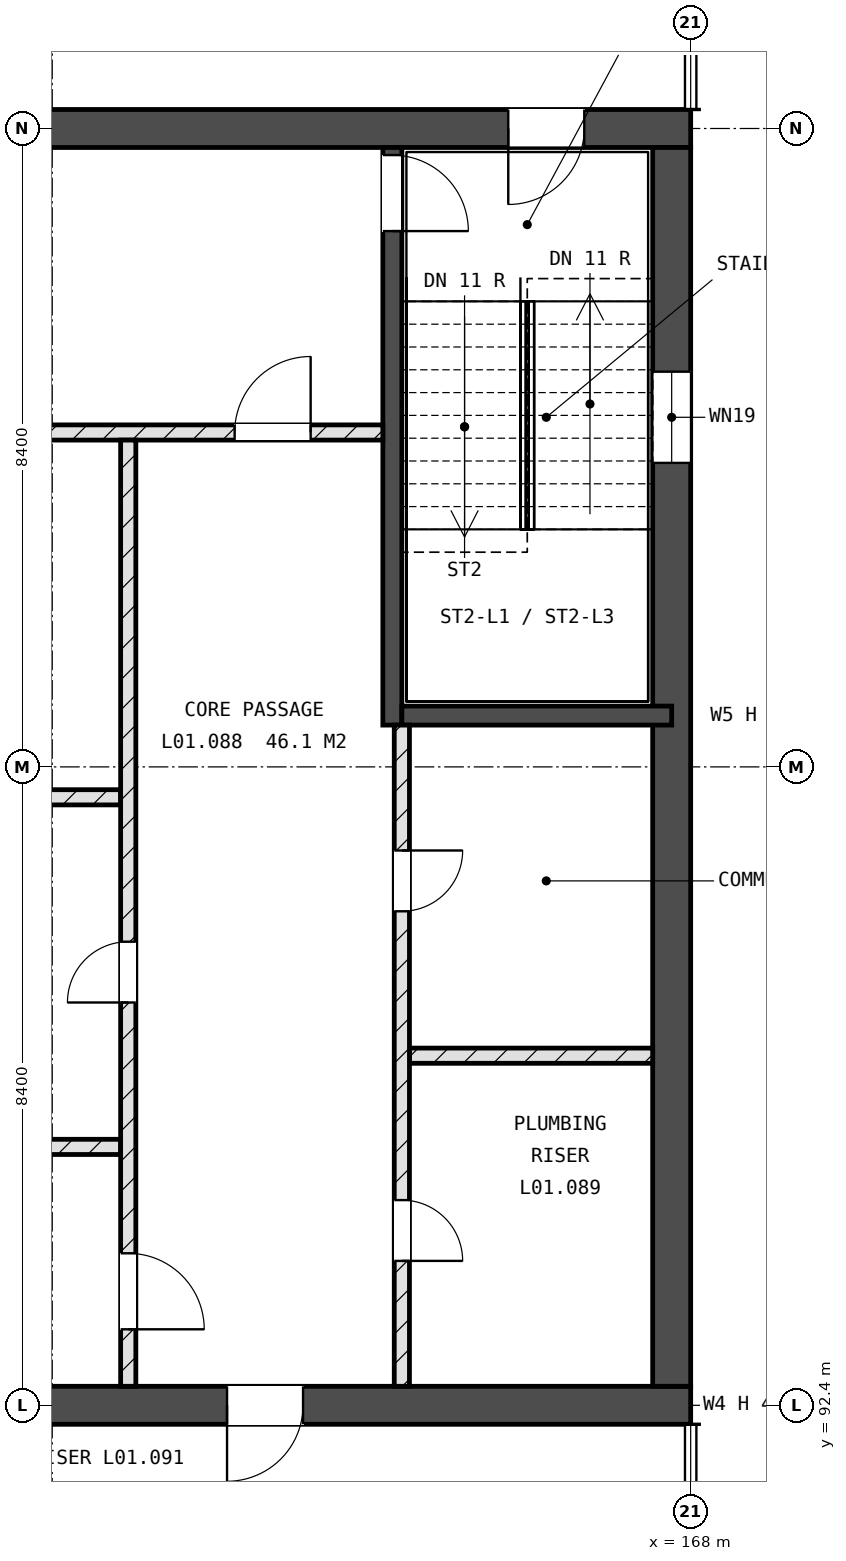
"""IFC4 building model, lengths in metres.
Left out: names, types, materials, properties, quantities, classifications, styles, units other than length and angle.
Written with IfcOpenShell. Run it as: python <this file> out.ifc"""

import sys

from ifc_helpers import new_model, si_unit, direction, frame, frame_2d, origin, place, context, subcontext, project, spatial, rectangle, extrude, element, fill, save


model = new_model("IFC4")
c1 = context("Model", 3, precision=1e-05, world=origin(), true_north=direction((0.0, 1.0)))
c2 = subcontext(c1, "Body", "Model", "MODEL_VIEW")
j1 = project(units=[si_unit("LENGTHUNIT", "METRE"), si_unit("PLANEANGLEUNIT", "RADIAN")], contexts=[c1])
p1 = place(None, origin())
s1 = spatial("IfcSite", under=j1, at=p1, CompositionType="ELEMENT")
p2 = place(p1, origin())
s2 = spatial("IfcBuilding", under=s1, at=p2, CompositionType="ELEMENT")
p3 = place(p2, frame((0.0, 0.0, 5.4)))
s3 = spatial("IfcBuildingStorey", under=s2, at=p3, CompositionType="ELEMENT", Elevation=5.4)
p4 = place(p3, frame((142.8, 92.4, -0.3), z_axis=(0.0, 0.0, 1.0), x_axis=(1.0, 0.0, 0.0)))
e1 = element("IfcWall", 1, at=p4, inside=s3, PredefinedType="SHEAR", context=c2, shape_type="SweptSolid", body=[
    extrude(rectangle(XDim=25.2, YDim=0.5, at=frame_2d((12.6, 0.0))), origin(), (0.0, 0.0, 1.0), 4.55),
])
p5 = place(p4, frame((1.4, 0.0, 0.3)))
e2 = element("IfcOpeningElement", 2, at=p5, cuts=e1, PredefinedType="OPENING", context=c2, shape_type="SweptSolid", body=[
    extrude(rectangle(XDim=1.0, YDim=2.1, at=frame_2d((0.5, 1.05))), frame((0.0, 0.26, 0.0), z_axis=(0.0, -1.0, 0.0), x_axis=(1.0, 0.0, 0.0)), (0.0, 0.0, 1.0), 0.52),
])
p6 = place(p4, frame((19.1, 0.0, 0.3)))
e3 = element("IfcOpeningElement", 3, at=p6, cuts=e1, PredefinedType="OPENING", context=c2, shape_type="SweptSolid", body=[
    extrude(rectangle(XDim=1.0, YDim=2.1, at=frame_2d((0.5, 1.05))), frame((0.0, 0.26, 0.0), z_axis=(0.0, -1.0, 0.0), x_axis=(1.0, 0.0, 0.0)), (0.0, 0.0, 1.0), 0.52),
])
p7 = place(p4, frame((10.4, 0.0, 0.3)))
e4 = element("IfcOpeningElement", 4, at=p7, cuts=e1, PredefinedType="OPENING", context=c2, shape_type="SweptSolid", body=[
    extrude(rectangle(XDim=1.0, YDim=2.1, at=frame_2d((0.5, 1.05))), frame((0.0, 0.26, 0.0), z_axis=(0.0, -1.0, 0.0), x_axis=(1.0, 0.0, 0.0)), (0.0, 0.0, 1.0), 0.52),
])
p8 = place(p3, frame((142.8, 109.2, -0.3), z_axis=(0.0, 0.0, 1.0), x_axis=(1.0, 0.0, 0.0)))
e5 = element("IfcWall", 5, at=p8, inside=s3, PredefinedType="SHEAR", context=c2, shape_type="SweptSolid", body=[
    extrude(rectangle(XDim=25.2, YDim=0.5, at=frame_2d((12.6, 0.0))), origin(), (0.0, 0.0, 1.0), 4.55),
])
p9 = place(p8, frame((22.8, 0.0, 0.3)))
e6 = element("IfcOpeningElement", 6, at=p9, cuts=e5, PredefinedType="OPENING", context=c2, shape_type="SweptSolid", body=[
    extrude(rectangle(XDim=1.0, YDim=2.1, at=frame_2d((0.5, 1.05))), frame((0.0, 0.26, 0.0), z_axis=(0.0, -1.0, 0.0), x_axis=(1.0, 0.0, 0.0)), (0.0, 0.0, 1.0), 0.52),
])
p10 = place(p8, frame((1.5, 0.0, 0.3)))
e7 = element("IfcOpeningElement", 7, at=p10, cuts=e5, PredefinedType="OPENING", context=c2, shape_type="SweptSolid", body=[
    extrude(rectangle(XDim=0.8, YDim=2.1, at=frame_2d((0.4, 1.05))), frame((0.0, 0.26, 0.0), z_axis=(0.0, -1.0, 0.0), x_axis=(1.0, 0.0, 0.0)), (0.0, 0.0, 1.0), 0.52),
])
p11 = place(p8, frame((13.4, 0.0, 0.3)))
e8 = element("IfcOpeningElement", 8, at=p11, cuts=e5, PredefinedType="OPENING", context=c2, shape_type="SweptSolid", body=[
    extrude(rectangle(XDim=1.0, YDim=2.1, at=frame_2d((0.5, 1.05))), frame((0.0, 0.26, 0.0), z_axis=(0.0, -1.0, 0.0), x_axis=(1.0, 0.0, 0.0)), (0.0, 0.0, 1.0), 0.52),
])
p12 = place(p3, frame((167.75, 92.65, -0.3), z_axis=(0.0, 0.0, 1.0), x_axis=(0.0, 1.0, 0.0)))
e9 = element("IfcWall", 9, at=p12, inside=s3, PredefinedType="SHEAR", context=c2, shape_type="SweptSolid", body=[
    extrude(rectangle(XDim=16.3, YDim=0.5, at=frame_2d((8.15, 0.0))), origin(), (0.0, 0.0, 1.0), 4.55),
])
p13 = place(p12, frame((12.15, 0.0, 1.9)))
e10 = element("IfcOpeningElement", 10, at=p13, cuts=e9, PredefinedType="OPENING", context=c2, shape_type="SweptSolid", body=[
    extrude(rectangle(XDim=1.2, YDim=0.9, at=frame_2d((0.6, 0.45))), frame((0.0, 0.26, 0.0), z_axis=(0.0, -1.0, 0.0), x_axis=(1.0, 0.0, 0.0)), (0.0, 0.0, 1.0), 0.52),
])
p14 = place(p3, frame((164.075, 101.35, -0.3), z_axis=(0.0, 0.0, 1.0), x_axis=(0.0, 1.0, 0.0)))
e11 = element("IfcWall", 11, at=p14, inside=s3, PredefinedType="SHEAR", context=c2, shape_type="SweptSolid", body=[
    extrude(rectangle(XDim=7.6, YDim=0.25, at=frame_2d((3.8, 0.0))), origin(), (0.0, 0.0, 1.0), 4.55),
])
p15 = place(p14, frame((6.5, 0.0, 0.3)))
e12 = element("IfcOpeningElement", 12, at=p15, cuts=e11, PredefinedType="OPENING", context=c2, shape_type="SweptSolid", body=[
    extrude(rectangle(XDim=1.0, YDim=2.1, at=frame_2d((0.5, 1.05))), frame((0.0, 0.135, 0.0), z_axis=(0.0, -1.0, 0.0), x_axis=(1.0, 0.0, 0.0)), (0.0, 0.0, 1.0), 0.27),
])
p16 = place(p3, frame((164.2, 101.475, -0.3), z_axis=(0.0, 0.0, 1.0), x_axis=(1.0, 0.0, 0.0)))
e13 = element("IfcWall", 13, at=p16, inside=s3, PredefinedType="SHEAR", context=c2, shape_type="SweptSolid", body=[
    extrude(rectangle(XDim=3.55, YDim=0.25, at=frame_2d((1.775, 0.0))), origin(), (0.0, 0.0, 1.0), 4.55),
])
p17 = place(p3, frame((158.25, 95.8, 0.0), z_axis=(0.0, 0.0, 1.0), x_axis=(1.0, 0.0, 0.0)))
e14 = element("IfcWall", 14, at=p17, inside=s3, PredefinedType="SOLIDWALL", context=c2, shape_type="SweptSolid", body=[
    extrude(rectangle(XDim=2.25, YDim=0.2, at=frame_2d((1.125, 0.0))), origin(), (0.0, 0.0, 1.0), 4.2),
])
p18 = place(p3, frame((164.3, 97.0, 0.0), z_axis=(0.0, 0.0, 1.0), x_axis=(1.0, 0.0, 0.0)))
e15 = element("IfcWall", 15, at=p18, inside=s3, PredefinedType="SOLIDWALL", context=c2, shape_type="SweptSolid", body=[
    extrude(rectangle(XDim=3.2, YDim=0.2, at=frame_2d((1.6, 0.0))), origin(), (0.0, 0.0, 1.0), 4.2),
])
p19 = place(p3, frame((146.5, 100.4, 0.0), z_axis=(0.0, 0.0, 1.0), x_axis=(1.0, 0.0, 0.0)))
e16 = element("IfcWall", 16, at=p19, inside=s3, PredefinedType="SOLIDWALL", context=c2, shape_type="SweptSolid", body=[
    extrude(rectangle(XDim=14.0, YDim=0.2, at=frame_2d((7.0, 0.0))), origin(), (0.0, 0.0, 1.0), 4.2),
])
p20 = place(p3, frame((143.3, 105.2, 0.0), z_axis=(0.0, 0.0, 1.0), x_axis=(1.0, 0.0, 0.0)))
e17 = element("IfcWall", 17, at=p20, inside=s3, PredefinedType="SOLIDWALL", context=c2, shape_type="SweptSolid", body=[
    extrude(rectangle(XDim=20.65, YDim=0.2, at=frame_2d((10.325, 0.0))), origin(), (0.0, 0.0, 1.0), 4.2),
])
p21 = place(p20, frame((11.4, 0.0, 0.0)))
e18 = element("IfcOpeningElement", 18, at=p21, cuts=e17, PredefinedType="OPENING", context=c2, shape_type="SweptSolid", body=[
    extrude(rectangle(XDim=0.8, YDim=2.1, at=frame_2d((0.4, 1.05))), frame((0.0, 0.11, 0.0), z_axis=(0.0, -1.0, 0.0), x_axis=(1.0, 0.0, 0.0)), (0.0, 0.0, 1.0), 0.22),
])
p22 = place(p20, frame((18.7, 0.0, 0.0)))
e19 = element("IfcOpeningElement", 19, at=p22, cuts=e17, PredefinedType="OPENING", context=c2, shape_type="SweptSolid", body=[
    extrude(rectangle(XDim=1.0, YDim=2.1, at=frame_2d((0.5, 1.05))), frame((0.0, 0.11, 0.0), z_axis=(0.0, -1.0, 0.0), x_axis=(1.0, 0.0, 0.0)), (0.0, 0.0, 1.0), 0.22),
])
p23 = place(p3, frame((160.6, 92.65, 0.0), z_axis=(0.0, 0.0, 1.0), x_axis=(0.0, 1.0, 0.0)))
e20 = element("IfcWall", 20, at=p23, inside=s3, PredefinedType="SOLIDWALL", context=c2, shape_type="SweptSolid", body=[
    extrude(rectangle(XDim=12.45, YDim=0.2, at=frame_2d((6.225, 0.0))), origin(), (0.0, 0.0, 1.0), 4.2),
])
p24 = place(p23, frame((5.05, 0.0, 0.0)))
e21 = element("IfcOpeningElement", 21, at=p24, cuts=e20, PredefinedType="OPENING", context=c2, shape_type="SweptSolid", body=[
    extrude(rectangle(XDim=0.8, YDim=2.1, at=frame_2d((0.4, 1.05))), frame((0.0, 0.11, 0.0), z_axis=(0.0, -1.0, 0.0), x_axis=(1.0, 0.0, 0.0)), (0.0, 0.0, 1.0), 0.22),
])
p25 = place(p23, frame((0.75, 0.0, 0.0)))
e22 = element("IfcOpeningElement", 22, at=p25, cuts=e20, PredefinedType="OPENING", context=c2, shape_type="SweptSolid", body=[
    extrude(rectangle(XDim=1.0, YDim=2.1, at=frame_2d((0.5, 1.05))), frame((0.0, 0.11, 0.0), z_axis=(0.0, -1.0, 0.0), x_axis=(1.0, 0.0, 0.0)), (0.0, 0.0, 1.0), 0.22),
])
p26 = place(p3, frame((164.2, 92.65, 0.0), z_axis=(0.0, 0.0, 1.0), x_axis=(0.0, 1.0, 0.0)))
e23 = element("IfcWall", 23, at=p26, inside=s3, PredefinedType="SOLIDWALL", context=c2, shape_type="SweptSolid", body=[
    extrude(rectangle(XDim=8.7, YDim=0.2, at=frame_2d((4.35, 0.0))), origin(), (0.0, 0.0, 1.0), 4.2),
])
p27 = place(p26, frame((1.65, 0.0, 0.0)))
e24 = element("IfcOpeningElement", 24, at=p27, cuts=e23, PredefinedType="OPENING", context=c2, shape_type="SweptSolid", body=[
    extrude(rectangle(XDim=0.8, YDim=2.1, at=frame_2d((0.4, 1.05))), frame((0.0, 0.11, 0.0), z_axis=(0.0, -1.0, 0.0), x_axis=(1.0, 0.0, 0.0)), (0.0, 0.0, 1.0), 0.22),
])
p28 = place(p26, frame((6.25, 0.0, 0.0)))
e25 = element("IfcOpeningElement", 25, at=p28, cuts=e23, PredefinedType="OPENING", context=c2, shape_type="SweptSolid", body=[
    extrude(rectangle(XDim=0.8, YDim=2.1, at=frame_2d((0.4, 1.05))), frame((0.0, 0.11, 0.0), z_axis=(0.0, -1.0, 0.0), x_axis=(1.0, 0.0, 0.0)), (0.0, 0.0, 1.0), 0.22),
])
p29 = place(p13, origin())
e26 = element("IfcWindow", 26, at=p29, inside=s3, PartitioningType="SINGLE_PANEL", PredefinedType="WINDOW", context=c2, shape_type="SweptSolid", body=[
    extrude(rectangle(XDim=1.2, YDim=0.9, at=frame_2d((0.6, 0.45))), frame((0.0, 0.03, 0.0), z_axis=(0.0, -1.0, 0.0), x_axis=(1.0, 0.0, 0.0)), (0.0, 0.0, 1.0), 0.06),
])
fill(e10, e26)
p30 = place(p15, origin())
e27 = element("IfcDoor", 27, at=p30, inside=s3, OperationType="SINGLE_SWING_LEFT", PredefinedType="DOOR", context=c2, shape_type="SweptSolid", body=[
    extrude(rectangle(XDim=1.0, YDim=2.1, at=frame_2d((0.5, 1.05))), frame((0.0, 0.025, 0.0), z_axis=(0.0, -1.0, 0.0), x_axis=(1.0, 0.0, 0.0)), (0.0, 0.0, 1.0), 0.05),
])
fill(e12, e27)
p31 = place(p9, origin())
e28 = element("IfcDoor", 28, at=p31, inside=s3, OperationType="SINGLE_SWING_LEFT", PredefinedType="DOOR", context=c2, shape_type="SweptSolid", body=[
    extrude(rectangle(XDim=1.0, YDim=2.1, at=frame_2d((0.5, 1.05))), frame((0.0, 0.025, 0.0), z_axis=(0.0, -1.0, 0.0), x_axis=(1.0, 0.0, 0.0)), (0.0, 0.0, 1.0), 0.05),
])
fill(e6, e28)
p32 = place(p27, origin())
e29 = element("IfcDoor", 29, at=p32, inside=s3, OperationType="SINGLE_SWING_LEFT", PredefinedType="DOOR", context=c2, shape_type="SweptSolid", body=[
    extrude(rectangle(XDim=0.8, YDim=2.1, at=frame_2d((0.4, 1.05))), frame((0.0, 0.025, 0.0), z_axis=(0.0, -1.0, 0.0), x_axis=(1.0, 0.0, 0.0)), (0.0, 0.0, 1.0), 0.05),
])
fill(e24, e29)
p33 = place(p28, origin())
e30 = element("IfcDoor", 30, at=p33, inside=s3, OperationType="SINGLE_SWING_RIGHT", PredefinedType="DOOR", context=c2, shape_type="SweptSolid", body=[
    extrude(rectangle(XDim=0.8, YDim=2.1, at=frame_2d((0.4, 1.05))), frame((0.0, 0.025, 0.0), z_axis=(0.0, -1.0, 0.0), x_axis=(1.0, 0.0, 0.0)), (0.0, 0.0, 1.0), 0.05),
])
fill(e25, e30)
p34 = place(p24, origin())
e31 = element("IfcDoor", 31, at=p34, inside=s3, OperationType="SINGLE_SWING_RIGHT", PredefinedType="DOOR", context=c2, shape_type="SweptSolid", body=[
    extrude(rectangle(XDim=0.8, YDim=2.1, at=frame_2d((0.4, 1.05))), frame((0.0, 0.025, 0.0), z_axis=(0.0, -1.0, 0.0), x_axis=(1.0, 0.0, 0.0)), (0.0, 0.0, 1.0), 0.05),
])
fill(e21, e31)
p35 = place(p6, origin())
e32 = element("IfcDoor", 32, at=p35, inside=s3, OperationType="SINGLE_SWING_LEFT", PredefinedType="DOOR", context=c2, shape_type="SweptSolid", body=[
    extrude(rectangle(XDim=1.0, YDim=2.1, at=frame_2d((0.5, 1.05))), frame((0.0, 0.025, 0.0), z_axis=(0.0, -1.0, 0.0), x_axis=(1.0, 0.0, 0.0)), (0.0, 0.0, 1.0), 0.05),
])
fill(e3, e32)
p36 = place(p25, origin())
e33 = element("IfcDoor", 33, at=p36, inside=s3, OperationType="SINGLE_SWING_LEFT", PredefinedType="DOOR", context=c2, shape_type="SweptSolid", body=[
    extrude(rectangle(XDim=1.0, YDim=2.1, at=frame_2d((0.5, 1.05))), frame((0.0, 0.025, 0.0), z_axis=(0.0, -1.0, 0.0), x_axis=(1.0, 0.0, 0.0)), (0.0, 0.0, 1.0), 0.05),
])
fill(e22, e33)
p37 = place(p22, origin())
e34 = element("IfcDoor", 34, at=p37, inside=s3, OperationType="SINGLE_SWING_LEFT", PredefinedType="DOOR", context=c2, shape_type="SweptSolid", body=[
    extrude(rectangle(XDim=1.0, YDim=2.1, at=frame_2d((0.5, 1.05))), frame((0.0, 0.025, 0.0), z_axis=(0.0, -1.0, 0.0), x_axis=(1.0, 0.0, 0.0)), (0.0, 0.0, 1.0), 0.05),
])
fill(e19, e34)
save(model, sys.argv[1])
